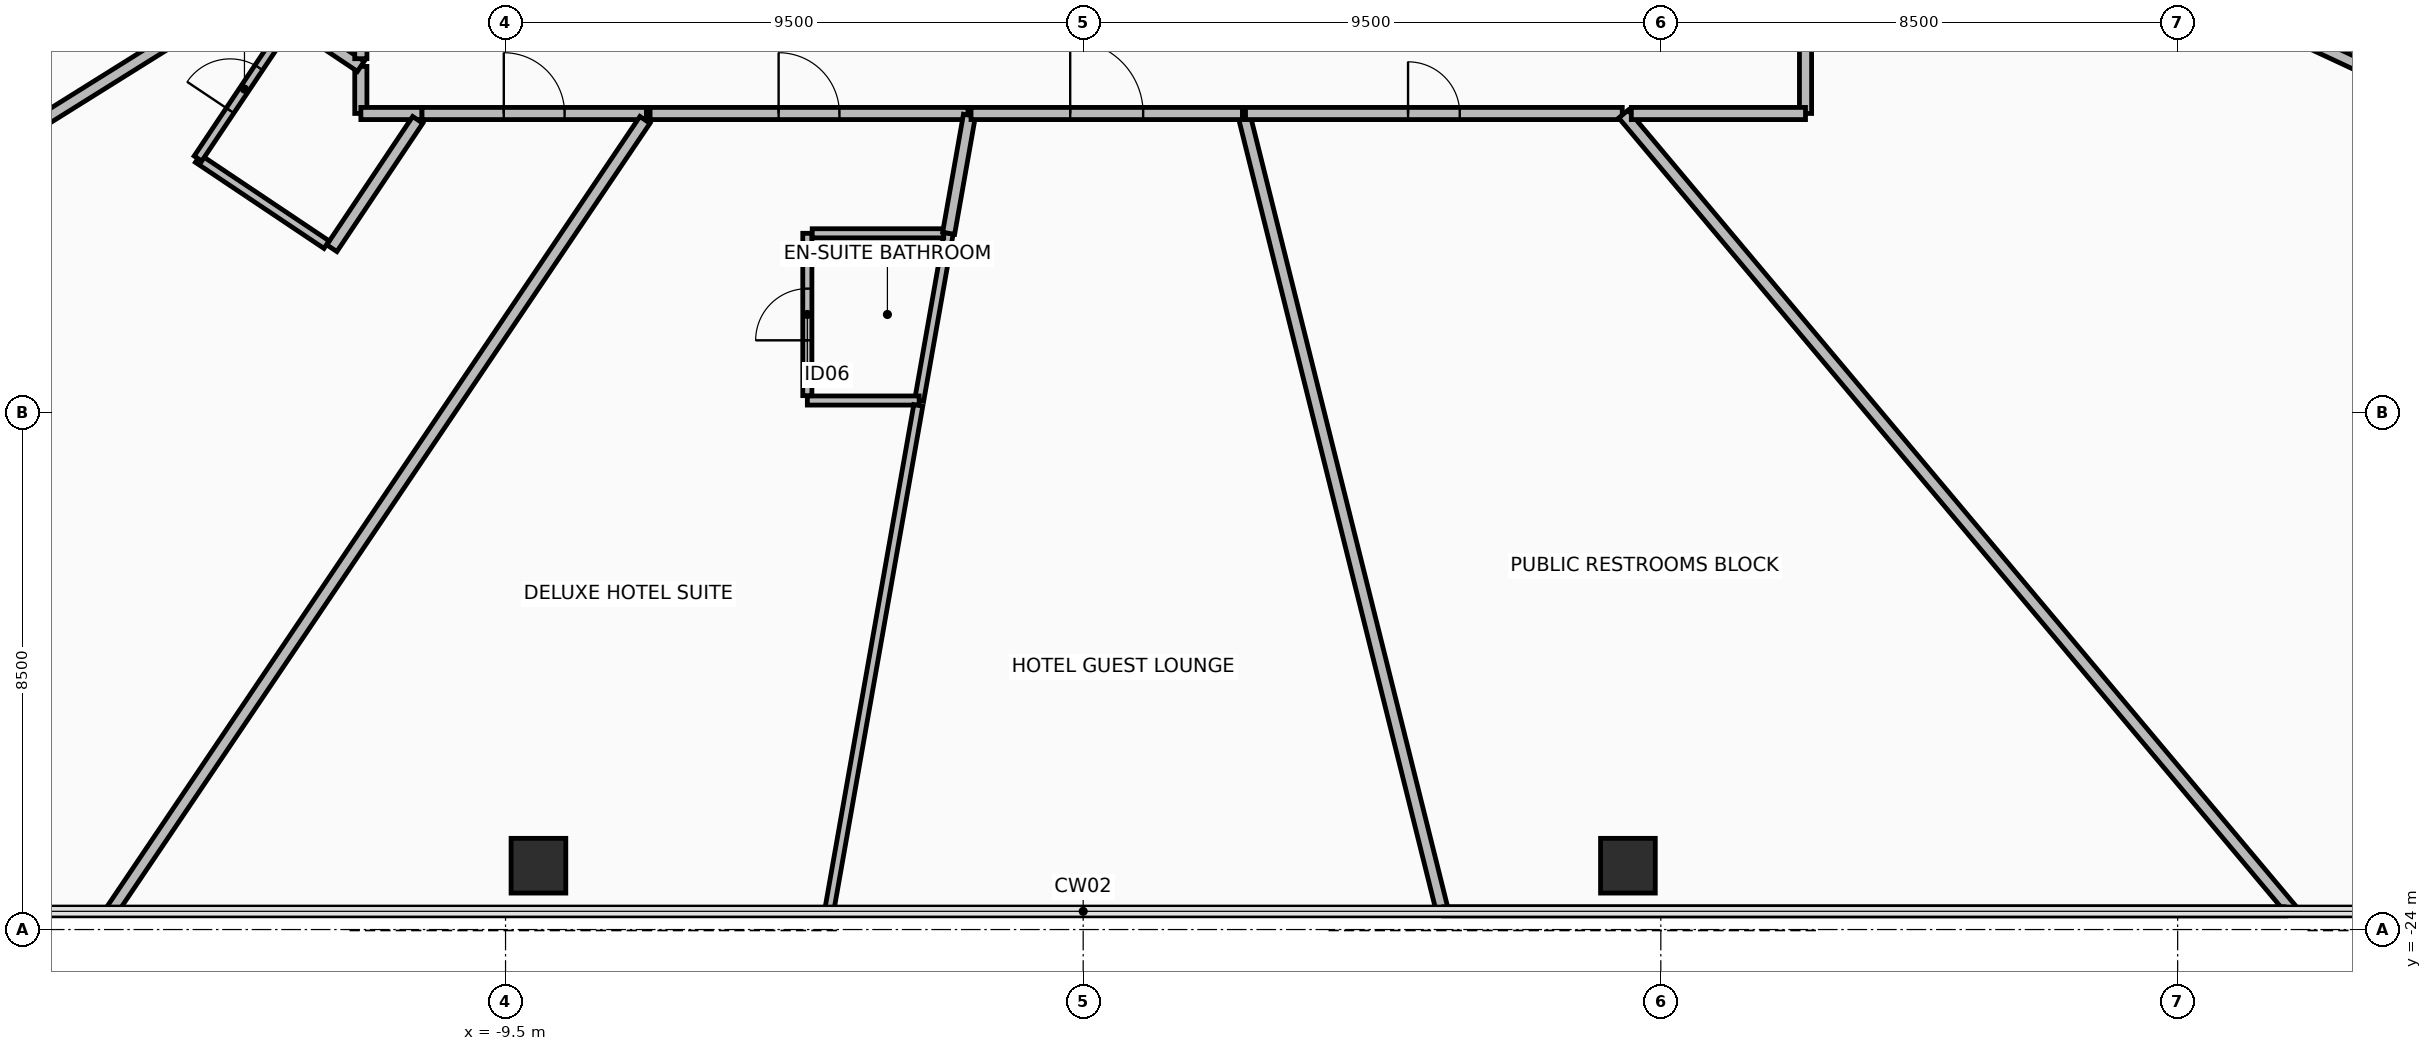
"""IFC4 building model, lengths in metres.
Left out: names, types, materials, properties, quantities, classifications, styles, units other than length and angle.
Written with IfcOpenShell. Run it as: python <this file> out.ifc"""

import sys

from ifc_helpers import new_model, si_unit, direction, frame, frame_2d, origin, origin_2d, place, context, subcontext, project, spatial, rectangle, hollow_rectangle, extrude, element, fill, save


model = new_model("IFC4")
c1 = context("Model", 3, precision=1e-05, world=origin(), true_north=direction((0.0, 1.0)))
c2 = subcontext(c1, "Body", "Model", "MODEL_VIEW")
j1 = project(units=[si_unit("LENGTHUNIT", "METRE"), si_unit("PLANEANGLEUNIT", "RADIAN")], contexts=[c1])
p1 = place(None, origin())
s1 = spatial("IfcSite", under=j1, at=p1, CompositionType="ELEMENT")
p2 = place(p1, origin())
s2 = spatial("IfcBuilding", under=s1, at=p2, CompositionType="ELEMENT")
p3 = place(p2, frame((0.0, 0.0, 42.05)))
s3 = spatial("IfcBuildingStorey", under=s2, at=p3, CompositionType="ELEMENT", Elevation=42.05)
for number, where, z_axis, x_axis in (
    (1, (-8.959, -22.95, 0.0), (0.0, 0.0, 1.0), (1.0, 0.0, 0.0)),
    (2, (8.959, -22.95, 0.0), (0.0, 0.0, 1.0), (1.0, 0.0, 0.0)),
):
    element("IfcColumn", number, at=place(p3, frame(where, z_axis=z_axis, x_axis=x_axis)), inside=s3, PredefinedType="COLUMN", context=c2, shape_type="SweptSolid", body=[
        extrude(hollow_rectangle(XDim=0.9, YDim=0.9, WallThickness=0.05, at=origin_2d()), origin(), (0.0, 0.0, 1.0), 3.4),
    ])
p4 = place(p3, frame((-11.88, -9.805, 0.0), z_axis=(0.0, 0.0, 1.0), x_axis=(0.0, -1.0, 0.0)))
e3 = element("IfcWall", 3, at=p4, inside=s3, PredefinedType="PARTITIONING", context=c2, shape_type="SweptSolid", body=[
    extrude(rectangle(XDim=0.774, YDim=0.2, at=frame_2d((0.387, 0.0))), origin(), (0.0, 0.0, 1.0), 2.62),
])
p5 = place(p3, frame((-11.879, -10.58, 0.0), z_axis=(0.0, 0.0, 1.0), x_axis=(1.0, 0.0, 0.0)))
e4 = element("IfcWall", 4, at=p5, inside=s3, PredefinedType="PARTITIONING", context=c2, shape_type="SweptSolid", body=[
    extrude(rectangle(XDim=1.006, YDim=0.2, at=frame_2d((0.503, 0.0))), origin(), (0.0, 0.0, 1.0), 3.225),
])
p6 = place(p3, frame((-10.944, -10.685, 0.0), z_axis=(0.0, 0.0, 1.0), x_axis=(-0.55629666488, -0.830983766775, 0.0)))
e5 = element("IfcWall", 5, at=p6, inside=s3, PredefinedType="PARTITIONING", context=c2, shape_type="SweptSolid", body=[
    extrude(rectangle(XDim=2.539, YDim=0.2, at=frame_2d((1.27, 0.0))), origin(), (0.0, 0.0, 1.0), 3.225),
])
p7 = place(p3, frame((-12.444, -12.737, 0.0), z_axis=(0.0, 0.0, 1.0), x_axis=(-0.830971323883, 0.55631525135, 0.0)))
e6 = element("IfcWall", 6, at=p7, inside=s3, PredefinedType="PARTITIONING", context=c2, shape_type="SweptSolid", body=[
    extrude(rectangle(XDim=2.545, YDim=0.15, at=frame_2d((1.272, 0.0))), origin(), (0.0, 0.0, 1.0), 2.62),
])
p8 = place(p3, frame((-14.559, -11.321, 0.0), z_axis=(0.0, 0.0, 1.0), x_axis=(0.556297218143, 0.830983396396, 0.0)))
e7 = element("IfcWall", 7, at=p8, inside=s3, PredefinedType="PARTITIONING", context=c2, shape_type="SweptSolid", body=[
    extrude(rectangle(XDim=2.75, YDim=0.15, at=frame_2d((1.375, 0.0))), origin(), (0.0, 0.0, 1.0), 2.62),
])
p9 = place(p8, frame((0.95, 0.0, 0.0)))
e8 = element("IfcOpeningElement", 8, at=p9, cuts=e7, PredefinedType="OPENING", context=c2, shape_type="SweptSolid", body=[
    extrude(rectangle(XDim=0.85, YDim=2.1, at=frame_2d((0.425, 1.05))), frame((0.0, 0.085, 0.0), z_axis=(0.0, -1.0, 0.0), x_axis=(1.0, 0.0, 0.0)), (0.0, 0.0, 1.0), 0.17),
])
p10 = place(p3, frame((-13.029, -9.036, 0.0), z_axis=(0.0, 0.0, 1.0), x_axis=(0.831071126881, -0.556166146097, 0.0)))
e9 = element("IfcWall", 9, at=p10, inside=s3, PredefinedType="PARTITIONING", context=c2, shape_type="SweptSolid", body=[
    extrude(rectangle(XDim=1.383, YDim=0.2, at=frame_2d((0.691, 0.0))), origin(), (0.0, 0.0, 1.0), 2.62),
])
p11 = place(p3, frame((-2.213, -12.55, 0.0), z_axis=(0.0, 0.0, 1.0), x_axis=(-0.173635703618, -0.984809952442, 0.0)))
e10 = element("IfcWall", 10, at=p11, inside=s3, PredefinedType="PARTITIONING", context=c2, shape_type="SweptSolid", body=[
    extrude(rectangle(XDim=2.792, YDim=0.15, at=frame_2d((1.396, 0.0))), origin(), (0.0, 0.0, 1.0), 3.225),
])
p12 = place(p3, frame((-2.698, -15.3, 0.0), z_axis=(0.0, 0.0, 1.0), x_axis=(-1.0, 0.0, 0.0)))
e11 = element("IfcWall", 11, at=p12, inside=s3, PredefinedType="PARTITIONING", context=c2, shape_type="SweptSolid", body=[
    extrude(rectangle(XDim=1.839, YDim=0.15, at=frame_2d((0.919, 0.0))), origin(), (0.0, 0.0, 1.0), 3.225),
])
p13 = place(p3, frame((-4.537, -15.22, 0.0), z_axis=(0.0, 0.0, 1.0), x_axis=(0.0, 1.0, 0.0)))
e12 = element("IfcWall", 12, at=p13, inside=s3, PredefinedType="PARTITIONING", context=c2, shape_type="SweptSolid", body=[
    extrude(rectangle(XDim=2.67, YDim=0.15, at=frame_2d((1.335, 0.0))), origin(), (0.0, 0.0, 1.0), 3.225),
])
p14 = place(p13, frame((0.91, 0.0, 0.0)))
e13 = element("IfcOpeningElement", 13, at=p14, cuts=e12, PredefinedType="OPENING", context=c2, shape_type="SweptSolid", body=[
    extrude(rectangle(XDim=0.85, YDim=2.1, at=frame_2d((0.425, 1.05))), frame((0.0, 0.085, 0.0), z_axis=(0.0, -1.0, 0.0), x_axis=(1.0, 0.0, 0.0)), (0.0, 0.0, 1.0), 0.17),
])
p15 = place(p3, frame((-4.457, -12.55, 0.0), z_axis=(0.0, 0.0, 1.0), x_axis=(1.0, 0.0, 0.0)))
e14 = element("IfcWall", 14, at=p15, inside=s3, PredefinedType="PARTITIONING", context=c2, shape_type="SweptSolid", body=[
    extrude(rectangle(XDim=2.163, YDim=0.15, at=frame_2d((1.081, 0.0))), origin(), (0.0, 0.0, 1.0), 3.225),
])
p16 = place(p3, frame((-11.892, -7.431, 0.0), z_axis=(0.0, 0.0, 1.0), x_axis=(-0.848048947086, -0.529917902458, 0.0)))
e15 = element("IfcWall", 15, at=p16, inside=s3, PredefinedType="PARTITIONING", context=c2, shape_type="SweptSolid", body=[
    extrude(rectangle(XDim=21.123, YDim=0.2, at=frame_2d((10.562, 0.0))), origin(), (0.0, 0.0, 1.0), 2.42),
])
p17 = place(p3, frame((5.904, -23.681, 0.0), z_axis=(0.0, 0.0, 1.0), x_axis=(-0.241929995817, 0.970293706629, 0.0)))
e16 = element("IfcWall", 16, at=p17, inside=s3, PredefinedType="PARTITIONING", context=c2, shape_type="SweptSolid", body=[
    extrude(rectangle(XDim=13.47, YDim=0.2, at=frame_2d((6.735, 0.0))), origin(), (0.0, 0.0, 1.0), 2.42),
])
p18 = place(p3, frame((2.67, -10.58, 0.0), z_axis=(0.0, 0.0, 1.0), x_axis=(1.0, 0.0, 0.0)))
e17 = element("IfcWall", 17, at=p18, inside=s3, PredefinedType="PARTITIONING", context=c2, shape_type="SweptSolid", body=[
    extrude(rectangle(XDim=6.196, YDim=0.2, at=frame_2d((3.098, 0.0))), origin(), (0.0, 0.0, 1.0), 2.62),
])
p19 = place(p18, frame((2.673, 0.0, 0.0)))
e18 = element("IfcOpeningElement", 18, at=p19, cuts=e17, PredefinedType="OPENING", context=c2, shape_type="SweptSolid", body=[
    extrude(rectangle(XDim=0.85, YDim=2.1, at=frame_2d((0.425, 1.05))), frame((0.0, 0.11, 0.0), z_axis=(0.0, -1.0, 0.0), x_axis=(1.0, 0.0, 0.0)), (0.0, 0.0, 1.0), 0.22),
])
p20 = place(p3, frame((8.885, -10.589, 0.0), z_axis=(0.0, 0.0, 1.0), x_axis=(0.642786207644, -0.76604561957, 0.0)))
e19 = element("IfcWall", 19, at=p20, inside=s3, PredefinedType="PARTITIONING", context=c2, shape_type="SweptSolid", body=[
    extrude(rectangle(XDim=17.115, YDim=0.2, at=frame_2d((8.558, 0.0))), origin(), (0.0, 0.0, 1.0), 2.42),
])
p21 = place(p3, frame((19.75, -23.7, 0.0), z_axis=(0.0, 0.0, 1.0), x_axis=(-1.0, 0.0, 0.0)))
e20 = element("IfcWall", 20, at=p21, inside=s3, PredefinedType="PARTITIONING", context=c2, shape_type="SweptSolid", body=[
    extrude(rectangle(XDim=13.821, YDim=0.15, at=frame_2d((6.91, 0.0))), origin(), (0.0, 0.0, 1.0), 3.225),
])
p22 = place(p3, frame((-11.88, -7.547, 0.0), z_axis=(0.0, 0.0, 1.0), x_axis=(0.0, -1.0, 0.0)))
e21 = element("IfcWall", 21, at=p22, inside=s3, PredefinedType="PARTITIONING", context=c2, shape_type="SweptSolid", body=[
    extrude(rectangle(XDim=2.132, YDim=0.2, at=frame_2d((1.066, 0.0))), origin(), (0.0, 0.0, 1.0), 2.62),
])
p23 = place(p3, frame((-10.874, -10.58, 0.0), z_axis=(0.0, 0.0, 1.0), x_axis=(1.0, 0.0, 0.0)))
e22 = element("IfcWall", 22, at=p23, inside=s3, PredefinedType="PARTITIONING", context=c2, shape_type="SweptSolid", body=[
    extrude(rectangle(XDim=3.69, YDim=0.2, at=frame_2d((1.845, 0.0))), origin(), (0.0, 0.0, 1.0), 2.62),
])
p24 = place(p23, frame((1.345, 0.0, 0.0)))
e23 = element("IfcOpeningElement", 23, at=p24, cuts=e22, PredefinedType="OPENING", context=c2, shape_type="SweptSolid", body=[
    extrude(rectangle(XDim=1.0, YDim=2.15, at=frame_2d((0.5, 1.075))), frame((0.0, 0.11, 0.0), z_axis=(0.0, -1.0, 0.0), x_axis=(1.0, 0.0, 0.0)), (0.0, 0.0, 1.0), 0.22),
])
p25 = place(p3, frame((-7.207, -10.685, 0.0), z_axis=(0.0, 0.0, 1.0), x_axis=(-0.55920336949, -0.82903051304, 0.0)))
e24 = element("IfcWall", 24, at=p25, inside=s3, PredefinedType="PARTITIONING", context=c2, shape_type="SweptSolid", body=[
    extrude(rectangle(XDim=15.686, YDim=0.2, at=frame_2d((7.843, 0.0))), origin(), (0.0, 0.0, 1.0), 2.42),
])
p26 = place(p3, frame((-7.123, -10.58, 0.0), z_axis=(0.0, 0.0, 1.0), x_axis=(1.0, 0.0, 0.0)))
e25 = element("IfcWall", 25, at=p26, inside=s3, PredefinedType="PARTITIONING", context=c2, shape_type="SweptSolid", body=[
    extrude(rectangle(XDim=5.228, YDim=0.2, at=frame_2d((2.614, 0.0))), origin(), (0.0, 0.0, 1.0), 3.225),
])
p27 = place(p26, frame((2.114, 0.0, 0.0)))
e26 = element("IfcOpeningElement", 26, at=p27, cuts=e25, PredefinedType="OPENING", context=c2, shape_type="SweptSolid", body=[
    extrude(rectangle(XDim=1.0, YDim=2.15, at=frame_2d((0.5, 1.075))), frame((0.0, 0.11, 0.0), z_axis=(0.0, -1.0, 0.0), x_axis=(1.0, 0.0, 0.0)), (0.0, 0.0, 1.0), 0.22),
])
p28 = place(p3, frame((-1.871, -10.609, 0.0), z_axis=(0.0, 0.0, 1.0), x_axis=(-0.17369345517, -0.984799768294, 0.0)))
e27 = element("IfcWall", 27, at=p28, inside=s3, PredefinedType="PARTITIONING", context=c2, shape_type="SweptSolid", body=[
    extrude(rectangle(XDim=1.971, YDim=0.2, at=frame_2d((0.985, 0.0))), origin(), (0.0, 0.0, 1.0), 3.225),
])
p29 = place(p3, frame((-2.712, -15.38, 0.0), z_axis=(0.0, 0.0, 1.0), x_axis=(-0.173646509235, -0.9848080472, 0.0)))
e28 = element("IfcWall", 28, at=p29, inside=s3, PredefinedType="PARTITIONING", context=c2, shape_type="SweptSolid", body=[
    extrude(rectangle(XDim=8.427, YDim=0.15, at=frame_2d((4.214, 0.0))), origin(), (0.0, 0.0, 1.0), 2.42),
])
p30 = place(p3, frame((-1.844, -10.58, 0.0), z_axis=(0.0, 0.0, 1.0), x_axis=(1.0, 0.0, 0.0)))
e29 = element("IfcWall", 29, at=p30, inside=s3, PredefinedType="PARTITIONING", context=c2, shape_type="SweptSolid", body=[
    extrude(rectangle(XDim=4.463, YDim=0.2, at=frame_2d((2.231, 0.0))), origin(), (0.0, 0.0, 1.0), 3.225),
])
p31 = place(p30, frame((1.631, 0.0, 0.0)))
e30 = element("IfcOpeningElement", 30, at=p31, cuts=e29, PredefinedType="OPENING", context=c2, shape_type="SweptSolid", body=[
    extrude(rectangle(XDim=1.2, YDim=2.15, at=frame_2d((0.6, 1.075))), frame((0.0, 0.11, 0.0), z_axis=(0.0, -1.0, 0.0), x_axis=(1.0, 0.0, 0.0)), (0.0, 0.0, 1.0), 0.22),
])
p32 = place(p3, frame((11.88, -10.579, 0.0), z_axis=(0.0, 0.0, 1.0), x_axis=(0.0, 1.0, 0.0)))
e31 = element("IfcWall", 31, at=p32, inside=s3, PredefinedType="PARTITIONING", context=c2, shape_type="SweptSolid", body=[
    extrude(rectangle(XDim=5.0, YDim=0.2, at=frame_2d((2.5, 0.0))), origin(), (0.0, 0.0, 1.0), 2.62),
])
p33 = place(p32, frame((1.9, 0.0, 0.0)))
e32 = element("IfcOpeningElement", 32, at=p33, cuts=e31, PredefinedType="OPENING", context=c2, shape_type="SweptSolid", body=[
    extrude(rectangle(XDim=1.2, YDim=2.15, at=frame_2d((0.6, 1.075))), frame((0.0, 0.11, 0.0), z_axis=(0.0, -1.0, 0.0), x_axis=(1.0, 0.0, 0.0)), (0.0, 0.0, 1.0), 0.22),
])
p34 = place(p3, frame((11.985, -5.589, 0.0), z_axis=(0.0, 0.0, 1.0), x_axis=(0.906307562188, -0.422618743929, 0.0)))
e33 = element("IfcWall", 33, at=p34, inside=s3, PredefinedType="PARTITIONING", context=c2, shape_type="SweptSolid", body=[
    extrude(rectangle(XDim=15.535, YDim=0.2, at=frame_2d((7.768, 0.0))), origin(), (0.0, 0.0, 1.0), 2.42),
])
p35 = place(p3, frame((9.015, -10.58, 0.0), z_axis=(0.0, 0.0, 1.0), x_axis=(1.0, 0.0, 0.0)))
e34 = element("IfcWall", 34, at=p35, inside=s3, PredefinedType="PARTITIONING", context=c2, shape_type="SweptSolid", body=[
    extrude(rectangle(XDim=2.865, YDim=0.2, at=frame_2d((1.432, 0.0))), origin(), (0.0, 0.0, 1.0), 2.62),
])
p36 = place(p9, origin())
e35 = element("IfcDoor", 35, at=p36, inside=s3, OperationType="SINGLE_SWING_RIGHT", PredefinedType="DOOR", context=c2, shape_type="SweptSolid", body=[
    extrude(rectangle(XDim=0.85, YDim=2.1, at=frame_2d((0.425, 1.05))), frame((0.0, 0.025, 0.0), z_axis=(0.0, -1.0, 0.0), x_axis=(1.0, 0.0, 0.0)), (0.0, 0.0, 1.0), 0.05),
])
fill(e8, e35)
p37 = place(p14, origin())
e36 = element("IfcDoor", 36, at=p37, inside=s3, OperationType="SINGLE_SWING_RIGHT", PredefinedType="DOOR", context=c2, shape_type="SweptSolid", body=[
    extrude(rectangle(XDim=0.85, YDim=2.1, at=frame_2d((0.425, 1.05))), frame((0.0, 0.025, 0.0), z_axis=(0.0, -1.0, 0.0), x_axis=(1.0, 0.0, 0.0)), (0.0, 0.0, 1.0), 0.05),
])
fill(e13, e36)
p38 = place(p19, origin())
e37 = element("IfcDoor", 37, at=p38, inside=s3, OperationType="SINGLE_SWING_RIGHT", PredefinedType="DOOR", context=c2, shape_type="SweptSolid", body=[
    extrude(rectangle(XDim=0.85, YDim=2.1, at=frame_2d((0.425, 1.05))), frame((0.0, 0.025, 0.0), z_axis=(0.0, -1.0, 0.0), x_axis=(1.0, 0.0, 0.0)), (0.0, 0.0, 1.0), 0.05),
])
fill(e18, e37)
p39 = place(p24, origin())
e38 = element("IfcDoor", 38, at=p39, inside=s3, OperationType="SINGLE_SWING_LEFT", PredefinedType="DOOR", context=c2, shape_type="SweptSolid", body=[
    extrude(rectangle(XDim=1.0, YDim=2.15, at=frame_2d((0.5, 1.075))), frame((0.0, 0.025, 0.0), z_axis=(0.0, -1.0, 0.0), x_axis=(1.0, 0.0, 0.0)), (0.0, 0.0, 1.0), 0.05),
])
fill(e23, e38)
p40 = place(p27, origin())
e39 = element("IfcDoor", 39, at=p40, inside=s3, OperationType="SINGLE_SWING_LEFT", PredefinedType="DOOR", context=c2, shape_type="SweptSolid", body=[
    extrude(rectangle(XDim=1.0, YDim=2.15, at=frame_2d((0.5, 1.075))), frame((0.0, 0.025, 0.0), z_axis=(0.0, -1.0, 0.0), x_axis=(1.0, 0.0, 0.0)), (0.0, 0.0, 1.0), 0.05),
])
fill(e26, e39)
p41 = place(p31, origin())
e40 = element("IfcDoor", 40, at=p41, inside=s3, OperationType="SINGLE_SWING_LEFT", PredefinedType="DOOR", context=c2, shape_type="SweptSolid", body=[
    extrude(rectangle(XDim=1.2, YDim=2.15, at=frame_2d((0.6, 1.075))), frame((0.0, 0.025, 0.0), z_axis=(0.0, -1.0, 0.0), x_axis=(1.0, 0.0, 0.0)), (0.0, 0.0, 1.0), 0.05),
])
fill(e30, e40)
save(model, sys.argv[1])
